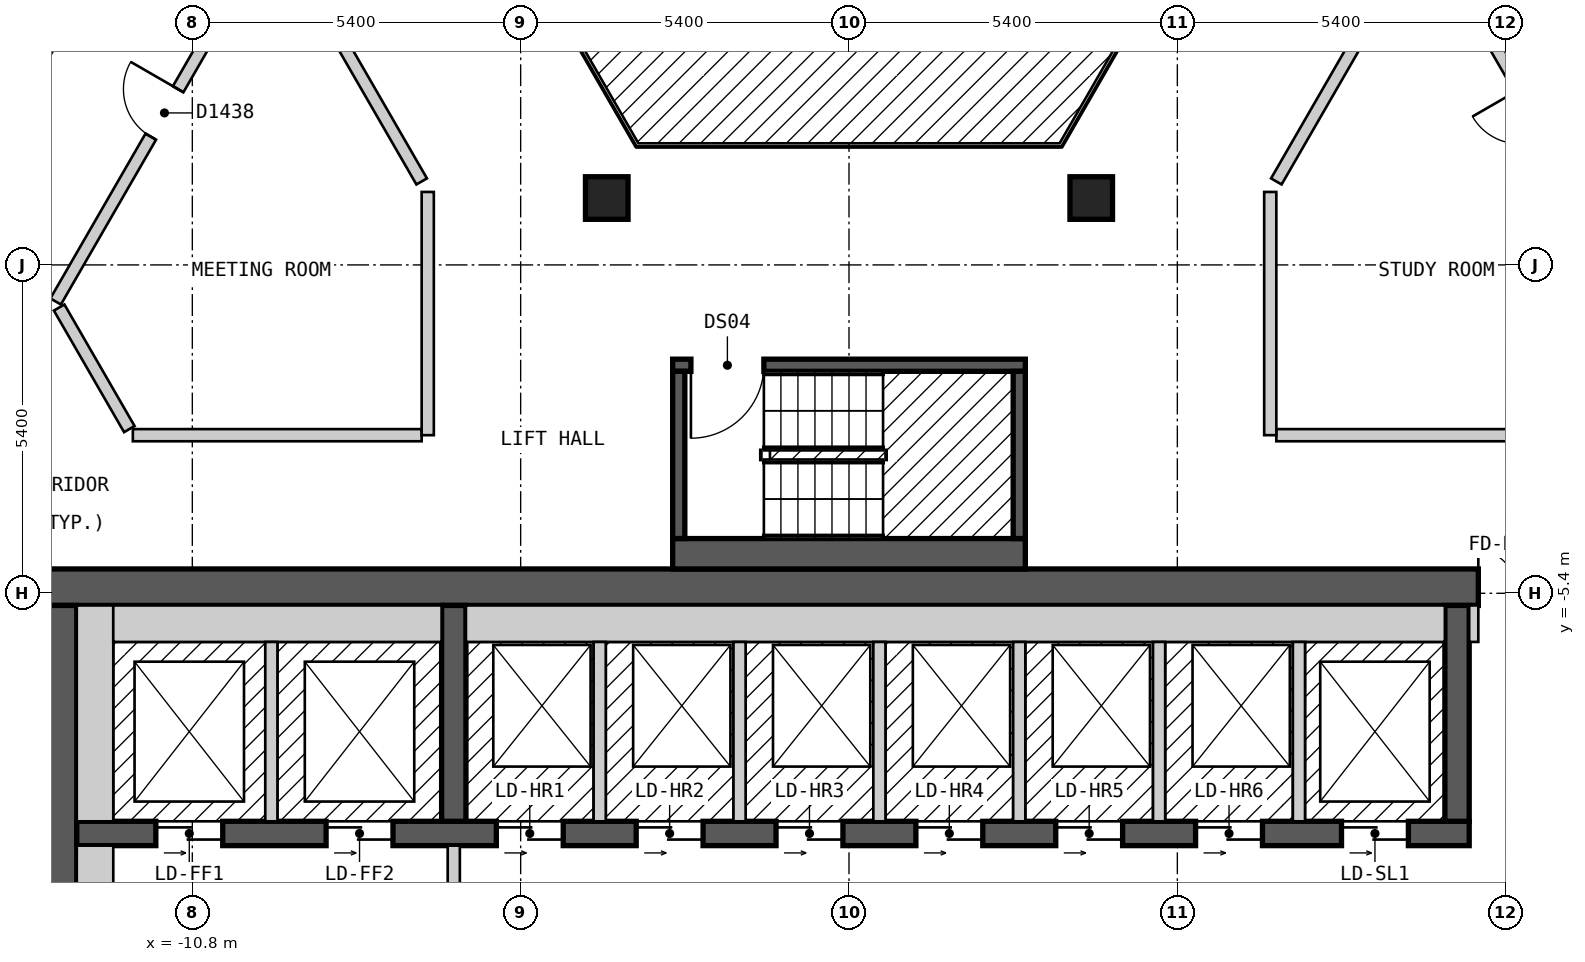
"""IFC4 building model, lengths in metres.
Left out: names, types, materials, properties, quantities, classifications, styles, units other than length and angle.
Written with IfcOpenShell. Run it as: python <this file> out.ifc"""

import sys

from ifc_helpers import new_model, si_unit, direction, frame, frame_2d, origin, origin_2d, place, context, subcontext, project, spatial, rectangle, extrude, element, fill, save


model = new_model("IFC4")
c1 = context("Model", 3, precision=1e-05, world=origin(), true_north=direction((0.0, 1.0)))
c2 = subcontext(c1, "Body", "Model", "MODEL_VIEW")
j1 = project(units=[si_unit("LENGTHUNIT", "METRE"), si_unit("PLANEANGLEUNIT", "RADIAN")], contexts=[c1])
p1 = place(None, origin())
s1 = spatial("IfcSite", under=j1, at=p1, CompositionType="ELEMENT")
p2 = place(p1, origin())
s2 = spatial("IfcBuilding", under=s1, at=p2, CompositionType="ELEMENT")
p3 = place(p2, frame((0.0, 0.0, 166.2)))
s3 = spatial("IfcBuildingStorey", under=s2, at=p3, CompositionType="ELEMENT", Elevation=166.2)
for number, where, z_axis, x_axis in (
    (1, (3.984, 1.1, 0.0), (0.0, 0.0, 1.0), (1.0, 0.0, 0.0)),
    (2, (-3.984, 1.1, 0.0), (0.0, 0.0, 1.0), (1.0, 0.0, 0.0)),
):
    element("IfcColumn", number, at=place(p3, frame(where, z_axis=z_axis, x_axis=x_axis)), inside=s3, PredefinedType="COLUMN", context=c2, shape_type="SweptSolid", body=[
        extrude(rectangle(XDim=0.7, YDim=0.7, at=origin_2d()), origin(), (0.0, 0.0, 1.0), 3.0),
    ])
p4 = place(p3, frame((-13.3, -5.3, 0.0), z_axis=(0.0, 0.0, 1.0), x_axis=(1.0, 0.0, 0.0)))
e3 = element("IfcWall", 3, at=p4, inside=s3, PredefinedType="SHEAR", context=c2, shape_type="SweptSolid", body=[
    extrude(rectangle(XDim=26.6, YDim=0.6, at=frame_2d((13.3, 0.0))), origin(), (0.0, 0.0, 1.0), 2.7),
])
p5 = place(p4, frame((23.65, 0.0, 0.0)))
e4 = element("IfcOpeningElement", 4, at=p5, cuts=e3, PredefinedType="OPENING", context=c2, shape_type="SweptSolid", body=[
    extrude(rectangle(XDim=1.2, YDim=2.1, at=frame_2d((0.6, 1.05))), frame((0.0, 0.31, 0.0), z_axis=(0.0, -1.0, 0.0), x_axis=(1.0, 0.0, 0.0)), (0.0, 0.0, 1.0), 0.62),
])
p6 = place(p3, frame((-13.0, -18.4, 0.0), z_axis=(0.0, 0.0, 1.0), x_axis=(0.0, 1.0, 0.0)))
e5 = element("IfcWall", 5, at=p6, inside=s3, PredefinedType="SHEAR", context=c2, shape_type="SweptSolid", body=[
    extrude(rectangle(XDim=12.8, YDim=0.6, at=frame_2d((6.4, 0.0))), origin(), (0.0, 0.0, 1.0), 2.7),
])
p7 = place(p6, frame((4.2, 0.0, 0.0)))
e6 = element("IfcOpeningElement", 6, at=p7, cuts=e5, PredefinedType="OPENING", context=c2, shape_type="SweptSolid", body=[
    extrude(rectangle(XDim=1.2, YDim=2.1, at=frame_2d((0.6, 1.05))), frame((0.0, 0.31, 0.0), z_axis=(0.0, -1.0, 0.0), x_axis=(1.0, 0.0, 0.0)), (0.0, 0.0, 1.0), 0.62),
])
p8 = place(p3, frame((-12.7, -9.35, 0.0), z_axis=(0.0, 0.0, 1.0), x_axis=(1.0, 0.0, 0.0)))
e7 = element("IfcWall", 7, at=p8, inside=s3, PredefinedType="SHEAR", context=c2, shape_type="SweptSolid", body=[
    extrude(rectangle(XDim=22.9, YDim=0.4, at=frame_2d((11.45, 0.0))), origin(), (0.0, 0.0, 1.0), 2.7),
])
p9 = place(p8, frame((1.3, 0.0, 0.0)))
e8 = element("IfcOpeningElement", 8, at=p9, cuts=e7, PredefinedType="OPENING", context=c2, shape_type="SweptSolid", body=[
    extrude(rectangle(XDim=1.1, YDim=2.1, at=frame_2d((0.55, 1.05))), frame((0.0, 0.21, 0.0), z_axis=(0.0, -1.0, 0.0), x_axis=(1.0, 0.0, 0.0)), (0.0, 0.0, 1.0), 0.42),
])
p10 = place(p8, frame((4.1, 0.0, 0.0)))
e9 = element("IfcOpeningElement", 9, at=p10, cuts=e7, PredefinedType="OPENING", context=c2, shape_type="SweptSolid", body=[
    extrude(rectangle(XDim=1.1, YDim=2.1, at=frame_2d((0.55, 1.05))), frame((0.0, 0.21, 0.0), z_axis=(0.0, -1.0, 0.0), x_axis=(1.0, 0.0, 0.0)), (0.0, 0.0, 1.0), 0.42),
])
p11 = place(p8, frame((6.9, 0.0, 0.0)))
e10 = element("IfcOpeningElement", 10, at=p11, cuts=e7, PredefinedType="OPENING", context=c2, shape_type="SweptSolid", body=[
    extrude(rectangle(XDim=1.1, YDim=2.1, at=frame_2d((0.55, 1.05))), frame((0.0, 0.21, 0.0), z_axis=(0.0, -1.0, 0.0), x_axis=(1.0, 0.0, 0.0)), (0.0, 0.0, 1.0), 0.42),
])
p12 = place(p8, frame((9.2, 0.0, 0.0)))
e11 = element("IfcOpeningElement", 11, at=p12, cuts=e7, PredefinedType="OPENING", context=c2, shape_type="SweptSolid", body=[
    extrude(rectangle(XDim=1.1, YDim=2.1, at=frame_2d((0.55, 1.05))), frame((0.0, 0.21, 0.0), z_axis=(0.0, -1.0, 0.0), x_axis=(1.0, 0.0, 0.0)), (0.0, 0.0, 1.0), 0.42),
])
p13 = place(p8, frame((11.5, 0.0, 0.0)))
e12 = element("IfcOpeningElement", 12, at=p13, cuts=e7, PredefinedType="OPENING", context=c2, shape_type="SweptSolid", body=[
    extrude(rectangle(XDim=1.1, YDim=2.1, at=frame_2d((0.55, 1.05))), frame((0.0, 0.21, 0.0), z_axis=(0.0, -1.0, 0.0), x_axis=(1.0, 0.0, 0.0)), (0.0, 0.0, 1.0), 0.42),
])
p14 = place(p8, frame((13.8, 0.0, 0.0)))
e13 = element("IfcOpeningElement", 13, at=p14, cuts=e7, PredefinedType="OPENING", context=c2, shape_type="SweptSolid", body=[
    extrude(rectangle(XDim=1.1, YDim=2.1, at=frame_2d((0.55, 1.05))), frame((0.0, 0.21, 0.0), z_axis=(0.0, -1.0, 0.0), x_axis=(1.0, 0.0, 0.0)), (0.0, 0.0, 1.0), 0.42),
])
p15 = place(p8, frame((16.1, 0.0, 0.0)))
e14 = element("IfcOpeningElement", 14, at=p15, cuts=e7, PredefinedType="OPENING", context=c2, shape_type="SweptSolid", body=[
    extrude(rectangle(XDim=1.1, YDim=2.1, at=frame_2d((0.55, 1.05))), frame((0.0, 0.21, 0.0), z_axis=(0.0, -1.0, 0.0), x_axis=(1.0, 0.0, 0.0)), (0.0, 0.0, 1.0), 0.42),
])
p16 = place(p8, frame((18.4, 0.0, 0.0)))
e15 = element("IfcOpeningElement", 15, at=p16, cuts=e7, PredefinedType="OPENING", context=c2, shape_type="SweptSolid", body=[
    extrude(rectangle(XDim=1.1, YDim=2.1, at=frame_2d((0.55, 1.05))), frame((0.0, 0.21, 0.0), z_axis=(0.0, -1.0, 0.0), x_axis=(1.0, 0.0, 0.0)), (0.0, 0.0, 1.0), 0.42),
])
p17 = place(p8, frame((20.8, 0.0, 0.0)))
e16 = element("IfcOpeningElement", 16, at=p17, cuts=e7, PredefinedType="OPENING", context=c2, shape_type="SweptSolid", body=[
    extrude(rectangle(XDim=1.1, YDim=2.1, at=frame_2d((0.55, 1.05))), frame((0.0, 0.21, 0.0), z_axis=(0.0, -1.0, 0.0), x_axis=(1.0, 0.0, 0.0)), (0.0, 0.0, 1.0), 0.42),
])
for number, where, z_axis, x_axis in (
    (17, (-6.5, -9.15, 0.0), (0.0, 0.0, 1.0), (0.0, 1.0, 0.0)),
    (18, (10.0, -9.15, 0.0), (0.0, 0.0, 1.0), (0.0, 1.0, 0.0)),
):
    element("IfcWall", number, at=place(p3, frame(where, z_axis=z_axis, x_axis=x_axis)), inside=s3, PredefinedType="SHEAR", context=c2, shape_type="SweptSolid", body=[
        extrude(rectangle(XDim=3.55, YDim=0.4, at=frame_2d((1.775, 0.0))), origin(), (0.0, 0.0, 1.0), 2.7),
    ])
p18 = place(p3, frame((-2.9, -4.75, 0.0), z_axis=(0.0, 0.0, 1.0), x_axis=(1.0, 0.0, 0.0)))
e19 = element("IfcWall", 19, at=p18, inside=s3, PredefinedType="SOLIDWALL", context=c2, shape_type="SweptSolid", body=[
    extrude(rectangle(XDim=5.8, YDim=0.5, at=frame_2d((2.9, 0.0))), origin(), (0.0, 0.0, 1.0), 2.7),
])
p19 = place(p3, frame((-2.9, -1.65, 0.0), z_axis=(0.0, 0.0, 1.0), x_axis=(1.0, 0.0, 0.0)))
e20 = element("IfcWall", 20, at=p19, inside=s3, PredefinedType="SOLIDWALL", context=c2, shape_type="SweptSolid", body=[
    extrude(rectangle(XDim=5.8, YDim=0.2, at=frame_2d((2.9, 0.0))), origin(), (0.0, 0.0, 1.0), 2.7),
])
p20 = place(p19, frame((0.3, 0.0, 0.0)))
e21 = element("IfcOpeningElement", 21, at=p20, cuts=e20, PredefinedType="OPENING", context=c2, shape_type="SweptSolid", body=[
    extrude(rectangle(XDim=1.2, YDim=2.1, at=frame_2d((0.6, 1.05))), frame((0.0, 0.11, 0.0), z_axis=(0.0, -1.0, 0.0), x_axis=(1.0, 0.0, 0.0)), (0.0, 0.0, 1.0), 0.22),
])
for number, where, z_axis, x_axis in (
    (22, (-2.8, -4.5, 0.0), (0.0, 0.0, 1.0), (0.0, 1.0, 0.0)),
    (23, (2.8, -4.5, 0.0), (0.0, 0.0, 1.0), (0.0, 1.0, 0.0)),
):
    element("IfcWall", number, at=place(p3, frame(where, z_axis=z_axis, x_axis=x_axis)), inside=s3, PredefinedType="SOLIDWALL", context=c2, shape_type="SweptSolid", body=[
        extrude(rectangle(XDim=2.75, YDim=0.2, at=frame_2d((1.375, 0.0))), origin(), (0.0, 0.0, 1.0), 2.7),
    ])
p21 = place(p3, frame((-9.411, 5.5, 0.0), z_axis=(0.0, 0.0, 1.0), x_axis=(0.500018099276, -0.86601495391, 0.0)))
e24 = element("IfcWall", 24, at=p21, inside=s3, PredefinedType="PARTITIONING", context=c2, shape_type="SweptSolid", body=[
    extrude(rectangle(XDim=4.765, YDim=0.2, at=frame_2d((2.383, 0.0))), origin(), (0.0, 0.0, 1.0), 2.7),
])
p22 = place(p3, frame((-12.99, -0.701, 0.0), z_axis=(0.0, 0.0, 1.0), x_axis=(0.499972710878, -0.866041158593, 0.0)))
e25 = element("IfcWall", 25, at=p22, inside=s3, PredefinedType="PARTITIONING", context=c2, shape_type="SweptSolid", body=[
    extrude(rectangle(XDim=2.308, YDim=0.2, at=frame_2d((1.154, 0.0))), origin(), (0.0, 0.0, 1.0), 2.7),
])
p23 = place(p3, frame((9.469, 5.6, 0.0), z_axis=(0.0, 0.0, 1.0), x_axis=(0.499964524401, -0.866045884662, 0.0)))
e26 = element("IfcWall", 26, at=p23, inside=s3, PredefinedType="PARTITIONING", context=c2, shape_type="SweptSolid", body=[
    extrude(rectangle(XDim=7.042, YDim=0.2, at=frame_2d((3.521, 0.0))), origin(), (0.0, 0.0, 1.0), 2.7),
])
p24 = place(p23, frame((3.129, 0.0, 0.0)))
e27 = element("IfcOpeningElement", 27, at=p24, cuts=e26, PredefinedType="OPENING", context=c2, shape_type="SweptSolid", body=[
    extrude(rectangle(XDim=0.9, YDim=2.1, at=frame_2d((0.45, 1.05))), frame((0.0, 0.11, 0.0), z_axis=(0.0, -1.0, 0.0), x_axis=(1.0, 0.0, 0.0)), (0.0, 0.0, 1.0), 0.22),
])
p25 = place(p3, frame((10.739, 7.8, 0.0), z_axis=(0.0, 0.0, 1.0), x_axis=(0.499964311759, -0.86604600742, 0.0)))
e28 = element("IfcWall", 28, at=p25, inside=s3, PredefinedType="PARTITIONING", context=c2, shape_type="SweptSolid", body=[
    extrude(rectangle(XDim=9.583, YDim=0.2, at=frame_2d((4.792, 0.0))), origin(), (0.0, 0.0, 1.0), 2.7),
])
p26 = place(p3, frame((-11.778, -2.8, 0.0), z_axis=(0.0, 0.0, 1.0), x_axis=(1.0, 0.0, 0.0)))
e29 = element("IfcWall", 29, at=p26, inside=s3, PredefinedType="PARTITIONING", context=c2, shape_type="SweptSolid", body=[
    extrude(rectangle(XDim=4.75, YDim=0.2, at=frame_2d((2.375, 0.0))), origin(), (0.0, 0.0, 1.0), 2.7),
])
p27 = place(p3, frame((7.028, -2.8, 0.0), z_axis=(0.0, 0.0, 1.0), x_axis=(1.0, 0.0, 0.0)))
e30 = element("IfcWall", 30, at=p27, inside=s3, PredefinedType="PARTITIONING", context=c2, shape_type="SweptSolid", body=[
    extrude(rectangle(XDim=4.634, YDim=0.2, at=frame_2d((2.317, 0.0))), origin(), (0.0, 0.0, 1.0), 2.7),
])
p28 = place(p3, frame((7.028, 1.373, 0.0), z_axis=(0.0, 0.0, 1.0), x_axis=(0.499953126767, 0.866052464367, 0.0)))
e31 = element("IfcWall", 31, at=p28, inside=s3, PredefinedType="PARTITIONING", context=c2, shape_type="SweptSolid", body=[
    extrude(rectangle(XDim=4.764, YDim=0.2, at=frame_2d((2.382, 0.0))), origin(), (0.0, 0.0, 1.0), 2.7),
])
p29 = place(p3, frame((-13.048, -0.601, 0.0), z_axis=(0.0, 0.0, 1.0), x_axis=(0.499982180423, 0.866035691677, 0.0)))
e32 = element("IfcWall", 32, at=p29, inside=s3, PredefinedType="PARTITIONING", context=c2, shape_type="SweptSolid", body=[
    extrude(rectangle(XDim=7.16, YDim=0.2, at=frame_2d((3.58, 0.0))), origin(), (0.0, 0.0, 1.0), 2.7),
])
p30 = place(p29, frame((3.13, 0.0, 0.0)))
e33 = element("IfcOpeningElement", 33, at=p30, cuts=e32, PredefinedType="OPENING", context=c2, shape_type="SweptSolid", body=[
    extrude(rectangle(XDim=0.9, YDim=2.1, at=frame_2d((0.45, 1.05))), frame((0.0, 0.11, 0.0), z_axis=(0.0, -1.0, 0.0), x_axis=(1.0, 0.0, 0.0)), (0.0, 0.0, 1.0), 0.22),
])
p31 = place(p3, frame((-15.53, -0.501, 0.0), z_axis=(0.0, 0.0, 1.0), x_axis=(0.499952498232, 0.866052827206, 0.0)))
e34 = element("IfcWall", 34, at=p31, inside=s3, PredefinedType="PARTITIONING", context=c2, shape_type="SweptSolid", body=[
    extrude(rectangle(XDim=9.585, YDim=0.2, at=frame_2d((4.792, 0.0))), origin(), (0.0, 0.0, 1.0), 2.7),
])
for number, where, z_axis, x_axis in (
    (35, (6.928, -2.8, 0.0), (0.0, 0.0, 1.0), (0.0, 1.0, 0.0)),
    (36, (-6.928, -2.8, 0.0), (0.0, 0.0, 1.0), (0.0, 1.0, 0.0)),
):
    element("IfcWall", number, at=place(p3, frame(where, z_axis=z_axis, x_axis=x_axis)), inside=s3, PredefinedType="PARTITIONING", context=c2, shape_type="SweptSolid", body=[
        extrude(rectangle(XDim=4.0, YDim=0.2, at=frame_2d((2.0, 0.0))), origin(), (0.0, 0.0, 1.0), 2.7),
    ])
p32 = place(p3, frame((-12.4, -13.0, 0.0), z_axis=(0.0, 0.0, 1.0), x_axis=(0.0, 1.0, 0.0)))
e37 = element("IfcWall", 37, at=p32, inside=s3, PredefinedType="PARTITIONING", context=c2, shape_type="SweptSolid", body=[
    extrude(rectangle(XDim=3.45, YDim=0.6, at=frame_2d((1.725, 0.0))), origin(), (0.0, 0.0, 1.0), 2.7),
])
p33 = place(p3, frame((-12.4, -9.15, 0.0), z_axis=(0.0, 0.0, 1.0), x_axis=(0.0, 1.0, 0.0)))
e38 = element("IfcWall", 38, at=p33, inside=s3, PredefinedType="SOLIDWALL", context=c2, shape_type="SweptSolid", body=[
    extrude(rectangle(XDim=3.55, YDim=0.6, at=frame_2d((1.775, 0.0))), origin(), (0.0, 0.0, 1.0), 2.7),
])
p34 = place(p3, frame((-12.1, -5.9, 0.0), z_axis=(0.0, 0.0, 1.0), x_axis=(1.0, 0.0, 0.0)))
e39 = element("IfcWall", 39, at=p34, inside=s3, PredefinedType="SOLIDWALL", context=c2, shape_type="SweptSolid", body=[
    extrude(rectangle(XDim=5.4, YDim=0.6, at=frame_2d((2.7, 0.0))), origin(), (0.0, 0.0, 1.0), 2.7),
])
p35 = place(p3, frame((-9.5, -9.15, 0.0), z_axis=(0.0, 0.0, 1.0), x_axis=(0.0, 1.0, 0.0)))
e40 = element("IfcWall", 40, at=p35, inside=s3, PredefinedType="SOLIDWALL", context=c2, shape_type="SweptSolid", body=[
    extrude(rectangle(XDim=2.95, YDim=0.2, at=frame_2d((1.475, 0.0))), origin(), (0.0, 0.0, 1.0), 2.7),
])
p36 = place(p3, frame((-6.5, -14.45, 0.0), z_axis=(0.0, 0.0, 1.0), x_axis=(0.0, 1.0, 0.0)))
e41 = element("IfcWall", 41, at=p36, inside=s3, PredefinedType="PARTITIONING", context=c2, shape_type="SweptSolid", body=[
    extrude(rectangle(XDim=4.9, YDim=0.2, at=frame_2d((2.45, 0.0))), origin(), (0.0, 0.0, 1.0), 2.7),
])
p37 = place(p36, frame((3.15, 0.0, 0.0), z_axis=(0.0, 0.0, 1.0), x_axis=(-1.0, 0.0, 0.0)))
e42 = element("IfcOpeningElement", 42, at=p37, cuts=e41, PredefinedType="OPENING", context=c2, shape_type="SweptSolid", body=[
    extrude(rectangle(XDim=1.4, YDim=2.1, at=frame_2d((0.7, 1.05))), frame((0.0, 0.11, 0.0), z_axis=(0.0, -1.0, 0.0), x_axis=(1.0, 0.0, 0.0)), (0.0, 0.0, 1.0), 0.22),
])
p38 = place(p3, frame((-6.3, -5.9, 0.0), z_axis=(0.0, 0.0, 1.0), x_axis=(1.0, 0.0, 0.0)))
e43 = element("IfcWall", 43, at=p38, inside=s3, PredefinedType="SOLIDWALL", context=c2, shape_type="SweptSolid", body=[
    extrude(rectangle(XDim=16.1, YDim=0.6, at=frame_2d((8.05, 0.0))), origin(), (0.0, 0.0, 1.0), 2.7),
])
for number, where, z_axis, x_axis in (
    (44, (-4.1, -9.15, 0.0), (0.0, 0.0, 1.0), (0.0, 1.0, 0.0)),
    (45, (-1.8, -9.15, 0.0), (0.0, 0.0, 1.0), (0.0, 1.0, 0.0)),
    (46, (0.5, -9.15, 0.0), (0.0, 0.0, 1.0), (0.0, 1.0, 0.0)),
    (47, (2.8, -9.15, 0.0), (0.0, 0.0, 1.0), (0.0, 1.0, 0.0)),
    (48, (5.1, -9.15, 0.0), (0.0, 0.0, 1.0), (0.0, 1.0, 0.0)),
    (49, (7.4, -9.15, 0.0), (0.0, 0.0, 1.0), (0.0, 1.0, 0.0)),
):
    element("IfcWall", number, at=place(p3, frame(where, z_axis=z_axis, x_axis=x_axis)), inside=s3, PredefinedType="SOLIDWALL", context=c2, shape_type="SweptSolid", body=[
        extrude(rectangle(XDim=2.95, YDim=0.2, at=frame_2d((1.475, 0.0))), origin(), (0.0, 0.0, 1.0), 2.7),
    ])
p39 = place(p3, frame((10.275, -6.2, 0.0), z_axis=(0.0, 0.0, 1.0), x_axis=(0.0, 1.0, 0.0)))
e50 = element("IfcWall", 50, at=p39, inside=s3, PredefinedType="PARTITIONING", context=c2, shape_type="SweptSolid", body=[
    extrude(rectangle(XDim=0.6, YDim=0.15, at=frame_2d((0.3, 0.0))), origin(), (0.0, 0.0, 1.0), 2.7),
])
p40 = place(p20, origin())
e51 = element("IfcDoor", 51, at=p40, inside=s3, OperationType="SINGLE_SWING_LEFT", PredefinedType="DOOR", context=c2, shape_type="SweptSolid", body=[
    extrude(rectangle(XDim=1.2, YDim=2.1, at=frame_2d((0.6, 1.05))), frame((0.0, 0.025, 0.0), z_axis=(0.0, -1.0, 0.0), x_axis=(1.0, 0.0, 0.0)), (0.0, 0.0, 1.0), 0.05),
])
fill(e21, e51)
p41 = place(p30, origin())
e52 = element("IfcDoor", 52, at=p41, inside=s3, OperationType="SINGLE_SWING_RIGHT", PredefinedType="DOOR", context=c2, shape_type="SweptSolid", body=[
    extrude(rectangle(XDim=0.9, YDim=2.1, at=frame_2d((0.45, 1.05))), frame((0.0, 0.025, 0.0), z_axis=(0.0, -1.0, 0.0), x_axis=(1.0, 0.0, 0.0)), (0.0, 0.0, 1.0), 0.05),
])
fill(e33, e52)
p42 = place(p9, origin())
e53 = element("IfcDoor", 53, at=p42, inside=s3, OperationType="DOUBLE_DOOR_SLIDING", PredefinedType="DOOR", context=c2, shape_type="SweptSolid", body=[
    extrude(rectangle(XDim=1.1, YDim=2.1, at=frame_2d((0.55, 1.05))), frame((0.0, 0.025, 0.0), z_axis=(0.0, -1.0, 0.0), x_axis=(1.0, 0.0, 0.0)), (0.0, 0.0, 1.0), 0.05),
])
fill(e8, e53)
p43 = place(p10, origin())
e54 = element("IfcDoor", 54, at=p43, inside=s3, OperationType="DOUBLE_DOOR_SLIDING", PredefinedType="DOOR", context=c2, shape_type="SweptSolid", body=[
    extrude(rectangle(XDim=1.1, YDim=2.1, at=frame_2d((0.55, 1.05))), frame((0.0, 0.025, 0.0), z_axis=(0.0, -1.0, 0.0), x_axis=(1.0, 0.0, 0.0)), (0.0, 0.0, 1.0), 0.05),
])
fill(e9, e54)
p44 = place(p11, origin())
e55 = element("IfcDoor", 55, at=p44, inside=s3, OperationType="DOUBLE_DOOR_SLIDING", PredefinedType="DOOR", context=c2, shape_type="SweptSolid", body=[
    extrude(rectangle(XDim=1.1, YDim=2.1, at=frame_2d((0.55, 1.05))), frame((0.0, 0.025, 0.0), z_axis=(0.0, -1.0, 0.0), x_axis=(1.0, 0.0, 0.0)), (0.0, 0.0, 1.0), 0.05),
])
fill(e10, e55)
p45 = place(p12, origin())
e56 = element("IfcDoor", 56, at=p45, inside=s3, OperationType="DOUBLE_DOOR_SLIDING", PredefinedType="DOOR", context=c2, shape_type="SweptSolid", body=[
    extrude(rectangle(XDim=1.1, YDim=2.1, at=frame_2d((0.55, 1.05))), frame((0.0, 0.025, 0.0), z_axis=(0.0, -1.0, 0.0), x_axis=(1.0, 0.0, 0.0)), (0.0, 0.0, 1.0), 0.05),
])
fill(e11, e56)
p46 = place(p13, origin())
e57 = element("IfcDoor", 57, at=p46, inside=s3, OperationType="DOUBLE_DOOR_SLIDING", PredefinedType="DOOR", context=c2, shape_type="SweptSolid", body=[
    extrude(rectangle(XDim=1.1, YDim=2.1, at=frame_2d((0.55, 1.05))), frame((0.0, 0.025, 0.0), z_axis=(0.0, -1.0, 0.0), x_axis=(1.0, 0.0, 0.0)), (0.0, 0.0, 1.0), 0.05),
])
fill(e12, e57)
p47 = place(p14, origin())
e58 = element("IfcDoor", 58, at=p47, inside=s3, OperationType="DOUBLE_DOOR_SLIDING", PredefinedType="DOOR", context=c2, shape_type="SweptSolid", body=[
    extrude(rectangle(XDim=1.1, YDim=2.1, at=frame_2d((0.55, 1.05))), frame((0.0, 0.025, 0.0), z_axis=(0.0, -1.0, 0.0), x_axis=(1.0, 0.0, 0.0)), (0.0, 0.0, 1.0), 0.05),
])
fill(e13, e58)
p48 = place(p15, origin())
e59 = element("IfcDoor", 59, at=p48, inside=s3, OperationType="DOUBLE_DOOR_SLIDING", PredefinedType="DOOR", context=c2, shape_type="SweptSolid", body=[
    extrude(rectangle(XDim=1.1, YDim=2.1, at=frame_2d((0.55, 1.05))), frame((0.0, 0.025, 0.0), z_axis=(0.0, -1.0, 0.0), x_axis=(1.0, 0.0, 0.0)), (0.0, 0.0, 1.0), 0.05),
])
fill(e14, e59)
p49 = place(p16, origin())
e60 = element("IfcDoor", 60, at=p49, inside=s3, OperationType="DOUBLE_DOOR_SLIDING", PredefinedType="DOOR", context=c2, shape_type="SweptSolid", body=[
    extrude(rectangle(XDim=1.1, YDim=2.1, at=frame_2d((0.55, 1.05))), frame((0.0, 0.025, 0.0), z_axis=(0.0, -1.0, 0.0), x_axis=(1.0, 0.0, 0.0)), (0.0, 0.0, 1.0), 0.05),
])
fill(e15, e60)
p50 = place(p17, origin())
e61 = element("IfcDoor", 61, at=p50, inside=s3, OperationType="DOUBLE_DOOR_SLIDING", PredefinedType="DOOR", context=c2, shape_type="SweptSolid", body=[
    extrude(rectangle(XDim=1.1, YDim=2.1, at=frame_2d((0.55, 1.05))), frame((0.0, 0.025, 0.0), z_axis=(0.0, -1.0, 0.0), x_axis=(1.0, 0.0, 0.0)), (0.0, 0.0, 1.0), 0.05),
])
fill(e16, e61)
p51 = place(p5, origin())
e62 = element("IfcDoor", 62, at=p51, inside=s3, OperationType="DOUBLE_DOOR_SINGLE_SWING", PredefinedType="DOOR", context=c2, shape_type="SweptSolid", body=[
    extrude(rectangle(XDim=1.2, YDim=2.1, at=frame_2d((0.6, 1.05))), frame((0.0, 0.025, 0.0), z_axis=(0.0, -1.0, 0.0), x_axis=(1.0, 0.0, 0.0)), (0.0, 0.0, 1.0), 0.05),
])
fill(e4, e62)
save(model, sys.argv[1])
